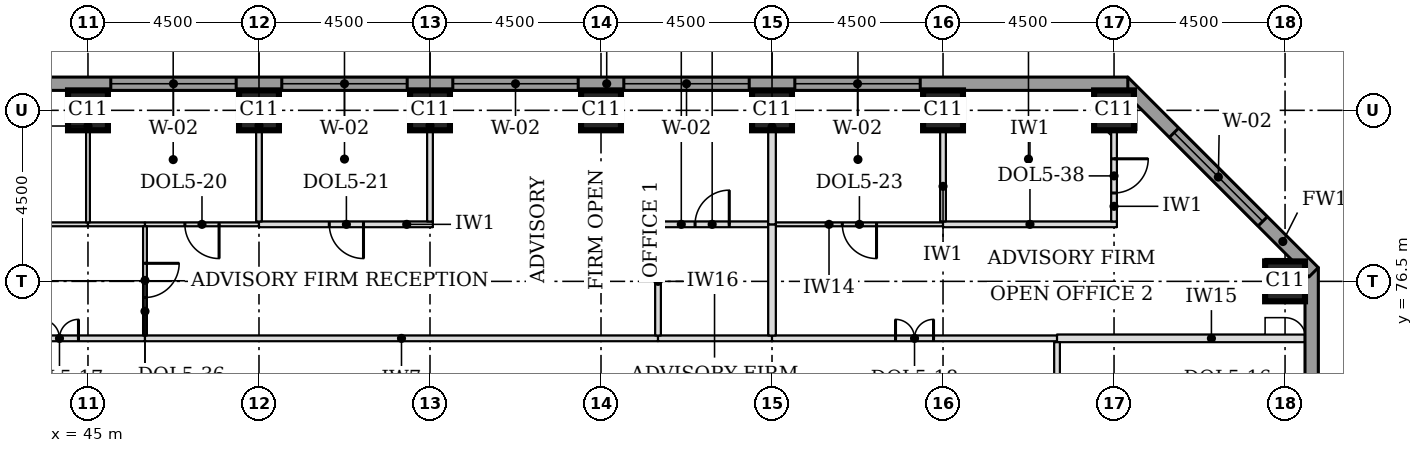
"""IFC4 building model, lengths in metres.
Left out: names, types, materials, properties, quantities, classifications, styles, units other than length and angle.
Written with IfcOpenShell. Run it as: python <this file> out.ifc"""

import sys

from ifc_helpers import new_model, si_unit, direction, frame, frame_2d, origin, origin_2d, place, context, subcontext, project, spatial, rectangle, extrude, element, fill, save


model = new_model("IFC4")
c1 = context("Model", 3, precision=1e-05, world=origin(), true_north=direction((0.0, 1.0)))
c2 = subcontext(c1, "Body", "Model", "MODEL_VIEW")
j1 = project(units=[si_unit("LENGTHUNIT", "METRE"), si_unit("PLANEANGLEUNIT", "RADIAN")], contexts=[c1])
p1 = place(None, origin())
s1 = spatial("IfcSite", under=j1, at=p1, CompositionType="ELEMENT")
p2 = place(p1, origin())
s2 = spatial("IfcBuilding", under=s1, at=p2, CompositionType="ELEMENT")
p3 = place(p2, frame((0.0, 0.0, 108.5)))
s3 = spatial("IfcBuildingStorey", under=s2, at=p3, CompositionType="ELEMENT", Elevation=108.5)
for number, where, z_axis, x_axis in (
    (1, (76.5, 76.5, 0.0), (0.0, 0.0, 1.0), (1.0, 0.0, 0.0)),
    (2, (45.0, 81.0, 0.0), (0.0, 0.0, 1.0), (1.0, 0.0, 0.0)),
    (3, (49.5, 81.0, 0.0), (0.0, 0.0, 1.0), (1.0, 0.0, 0.0)),
    (4, (54.0, 81.0, 0.0), (0.0, 0.0, 1.0), (1.0, 0.0, 0.0)),
    (5, (58.5, 81.0, 0.0), (0.0, 0.0, 1.0), (1.0, 0.0, 0.0)),
    (6, (63.0, 81.0, 0.0), (0.0, 0.0, 1.0), (1.0, 0.0, 0.0)),
    (7, (67.5, 81.0, 0.0), (0.0, 0.0, 1.0), (1.0, 0.0, 0.0)),
    (8, (72.0, 81.0, 0.0), (0.0, 0.0, 1.0), (1.0, 0.0, 0.0)),
):
    element("IfcColumn", number, at=place(p3, frame(where, z_axis=z_axis, x_axis=x_axis)), inside=s3, PredefinedType="COLUMN", context=c2, shape_type="SweptSolid", body=[
        extrude(rectangle(XDim=1.05, YDim=1.05, at=origin_2d()), origin(), (0.0, 0.0, 1.0), 3.7),
    ])
p4 = place(p3, frame((77.2, 44.638, 0.0), z_axis=(0.0, 0.0, 1.0), x_axis=(0.0, 1.0, 0.0)))
e9 = element("IfcWall", 9, at=p4, inside=s3, PredefinedType="STANDARD", context=c2, shape_type="SweptSolid", body=[
    extrude(rectangle(XDim=32.225, YDim=0.35, at=frame_2d((16.112, 0.0))), origin(), (0.0, 0.0, 1.0), 3.525),
])
p5 = place(p4, frame((5.462, 0.0, 0.9)))
e10 = element("IfcOpeningElement", 10, at=p5, cuts=e9, PredefinedType="OPENING", context=c2, shape_type="SweptSolid", body=[
    extrude(rectangle(XDim=3.3, YDim=1.9, at=frame_2d((1.65, 0.95))), frame((0.0, 0.185, 0.0), z_axis=(0.0, -1.0, 0.0), x_axis=(1.0, 0.0, 0.0)), (0.0, 0.0, 1.0), 0.37),
])
p6 = place(p4, frame((9.962, 0.0, 0.9)))
e11 = element("IfcOpeningElement", 11, at=p6, cuts=e9, PredefinedType="OPENING", context=c2, shape_type="SweptSolid", body=[
    extrude(rectangle(XDim=3.3, YDim=1.9, at=frame_2d((1.65, 0.95))), frame((0.0, 0.185, 0.0), z_axis=(0.0, -1.0, 0.0), x_axis=(1.0, 0.0, 0.0)), (0.0, 0.0, 1.0), 0.37),
])
p7 = place(p4, frame((14.462, 0.0, 0.9)))
e12 = element("IfcOpeningElement", 12, at=p7, cuts=e9, PredefinedType="OPENING", context=c2, shape_type="SweptSolid", body=[
    extrude(rectangle(XDim=3.3, YDim=1.9, at=frame_2d((1.65, 0.95))), frame((0.0, 0.185, 0.0), z_axis=(0.0, -1.0, 0.0), x_axis=(1.0, 0.0, 0.0)), (0.0, 0.0, 1.0), 0.37),
])
p8 = place(p4, frame((18.962, 0.0, 0.9)))
e13 = element("IfcOpeningElement", 13, at=p8, cuts=e9, PredefinedType="OPENING", context=c2, shape_type="SweptSolid", body=[
    extrude(rectangle(XDim=3.3, YDim=1.9, at=frame_2d((1.65, 0.95))), frame((0.0, 0.185, 0.0), z_axis=(0.0, -1.0, 0.0), x_axis=(1.0, 0.0, 0.0)), (0.0, 0.0, 1.0), 0.37),
])
p9 = place(p4, frame((23.462, 0.0, 0.9)))
e14 = element("IfcOpeningElement", 14, at=p9, cuts=e9, PredefinedType="OPENING", context=c2, shape_type="SweptSolid", body=[
    extrude(rectangle(XDim=3.3, YDim=1.9, at=frame_2d((1.65, 0.95))), frame((0.0, 0.185, 0.0), z_axis=(0.0, -1.0, 0.0), x_axis=(1.0, 0.0, 0.0)), (0.0, 0.0, 1.0), 0.37),
])
p10 = place(p3, frame((77.251, 76.739, 0.0), z_axis=(0.0, 0.0, 1.0), x_axis=(-0.707106781187, 0.707106781187, 0.0)))
e15 = element("IfcWall", 15, at=p10, inside=s3, PredefinedType="STANDARD", context=c2, shape_type="SweptSolid", body=[
    extrude(rectangle(XDim=7.089, YDim=0.35, at=frame_2d((3.544, 0.0))), origin(), (0.0, 0.0, 1.0), 3.525),
])
p11 = place(p10, frame((1.894, 0.0, 0.9)))
e16 = element("IfcOpeningElement", 16, at=p11, cuts=e15, PredefinedType="OPENING", context=c2, shape_type="SweptSolid", body=[
    extrude(rectangle(XDim=3.3, YDim=1.9, at=frame_2d((1.65, 0.95))), frame((0.0, 0.185, 0.0), z_axis=(0.0, -1.0, 0.0), x_axis=(1.0, 0.0, 0.0)), (0.0, 0.0, 1.0), 0.37),
])
p12 = place(p3, frame((72.362, 81.7, 0.0), z_axis=(0.0, 0.0, 1.0), x_axis=(-1.0, 0.0, 0.0)))
e17 = element("IfcWall", 17, at=p12, inside=s3, PredefinedType="STANDARD", context=c2, shape_type="SweptSolid", body=[
    extrude(rectangle(XDim=32.225, YDim=0.35, at=frame_2d((16.112, 0.0))), origin(), (0.0, 0.0, 1.0), 3.525),
])
p13 = place(p12, frame((5.462, 0.0, 0.9)))
e18 = element("IfcOpeningElement", 18, at=p13, cuts=e17, PredefinedType="OPENING", context=c2, shape_type="SweptSolid", body=[
    extrude(rectangle(XDim=3.3, YDim=1.9, at=frame_2d((1.65, 0.95))), frame((0.0, 0.185, 0.0), z_axis=(0.0, -1.0, 0.0), x_axis=(1.0, 0.0, 0.0)), (0.0, 0.0, 1.0), 0.37),
])
p14 = place(p12, frame((9.962, 0.0, 0.9)))
e19 = element("IfcOpeningElement", 19, at=p14, cuts=e17, PredefinedType="OPENING", context=c2, shape_type="SweptSolid", body=[
    extrude(rectangle(XDim=3.3, YDim=1.9, at=frame_2d((1.65, 0.95))), frame((0.0, 0.185, 0.0), z_axis=(0.0, -1.0, 0.0), x_axis=(1.0, 0.0, 0.0)), (0.0, 0.0, 1.0), 0.37),
])
p15 = place(p12, frame((14.462, 0.0, 0.9)))
e20 = element("IfcOpeningElement", 20, at=p15, cuts=e17, PredefinedType="OPENING", context=c2, shape_type="SweptSolid", body=[
    extrude(rectangle(XDim=3.3, YDim=1.9, at=frame_2d((1.65, 0.95))), frame((0.0, 0.185, 0.0), z_axis=(0.0, -1.0, 0.0), x_axis=(1.0, 0.0, 0.0)), (0.0, 0.0, 1.0), 0.37),
])
p16 = place(p12, frame((18.962, 0.0, 0.9)))
e21 = element("IfcOpeningElement", 21, at=p16, cuts=e17, PredefinedType="OPENING", context=c2, shape_type="SweptSolid", body=[
    extrude(rectangle(XDim=3.3, YDim=1.9, at=frame_2d((1.65, 0.95))), frame((0.0, 0.185, 0.0), z_axis=(0.0, -1.0, 0.0), x_axis=(1.0, 0.0, 0.0)), (0.0, 0.0, 1.0), 0.37),
])
p17 = place(p12, frame((23.462, 0.0, 0.9)))
e22 = element("IfcOpeningElement", 22, at=p17, cuts=e17, PredefinedType="OPENING", context=c2, shape_type="SweptSolid", body=[
    extrude(rectangle(XDim=3.3, YDim=1.9, at=frame_2d((1.65, 0.95))), frame((0.0, 0.185, 0.0), z_axis=(0.0, -1.0, 0.0), x_axis=(1.0, 0.0, 0.0)), (0.0, 0.0, 1.0), 0.37),
])
p18 = place(p3, frame((42.0, 75.0, 0.0), z_axis=(0.0, 0.0, 1.0), x_axis=(1.0, 0.0, 0.0)))
e23 = element("IfcWall", 23, at=p18, inside=s3, PredefinedType="PARTITIONING", context=c2, shape_type="SweptSolid", body=[
    extrude(rectangle(XDim=4.5, YDim=0.15, at=frame_2d((2.25, 0.0))), origin(), (0.0, 0.0, 1.0), 3.55),
])
p19 = place(p18, frame((1.75, 0.0, 0.0)))
e24 = element("IfcOpeningElement", 24, at=p19, cuts=e23, PredefinedType="OPENING", context=c2, shape_type="SweptSolid", body=[
    extrude(rectangle(XDim=1.0, YDim=2.1, at=frame_2d((0.5, 1.05))), frame((0.0, 0.085, 0.0), z_axis=(0.0, -1.0, 0.0), x_axis=(1.0, 0.0, 0.0)), (0.0, 0.0, 1.0), 0.17),
])
p20 = place(p3, frame((46.5, 75.0, 0.0), z_axis=(0.0, 0.0, 1.0), x_axis=(1.0, 0.0, 0.0)))
e25 = element("IfcWall", 25, at=p20, inside=s3, PredefinedType="PARTITIONING", context=c2, shape_type="SweptSolid", body=[
    extrude(rectangle(XDim=13.5, YDim=0.15, at=frame_2d((6.75, 0.0))), origin(), (0.0, 0.0, 1.0), 3.55),
])
p21 = place(p3, frame((60.0, 75.0, 0.0), z_axis=(0.0, 0.0, 1.0), x_axis=(1.0, 0.0, 0.0)))
e26 = element("IfcWall", 26, at=p21, inside=s3, PredefinedType="PARTITIONING", context=c2, shape_type="SweptSolid", body=[
    extrude(rectangle(XDim=3.0, YDim=0.15, at=frame_2d((1.5, 0.0))), origin(), (0.0, 0.0, 1.0), 3.55),
])
p22 = place(p3, frame((63.0, 75.0, 0.0), z_axis=(0.0, 0.0, 1.0), x_axis=(1.0, 0.0, 0.0)))
e27 = element("IfcWall", 27, at=p22, inside=s3, PredefinedType="PARTITIONING", context=c2, shape_type="SweptSolid", body=[
    extrude(rectangle(XDim=7.5, YDim=0.15, at=frame_2d((3.75, 0.0))), origin(), (0.0, 0.0, 1.0), 3.55),
])
p23 = place(p22, frame((3.25, 0.0, 0.0)))
e28 = element("IfcOpeningElement", 28, at=p23, cuts=e27, PredefinedType="OPENING", context=c2, shape_type="SweptSolid", body=[
    extrude(rectangle(XDim=1.0, YDim=2.1, at=frame_2d((0.5, 1.05))), frame((0.0, 0.085, 0.0), z_axis=(0.0, -1.0, 0.0), x_axis=(1.0, 0.0, 0.0)), (0.0, 0.0, 1.0), 0.17),
])
p24 = place(p3, frame((70.5, 75.0, 0.0), z_axis=(0.0, 0.0, 1.0), x_axis=(1.0, 0.0, 0.0)))
e29 = element("IfcWall", 29, at=p24, inside=s3, PredefinedType="PARTITIONING", context=c2, shape_type="SweptSolid", body=[
    extrude(rectangle(XDim=6.525, YDim=0.2, at=frame_2d((3.262, 0.0))), origin(), (0.0, 0.0, 1.0), 3.55),
])
p25 = place(p3, frame((40.55, 78.0, 0.0), z_axis=(0.0, 0.0, 1.0), x_axis=(1.0, 0.0, 0.0)))
e30 = element("IfcWall", 30, at=p25, inside=s3, PredefinedType="PARTITIONING", context=c2, shape_type="SweptSolid", body=[
    extrude(rectangle(XDim=4.45, YDim=0.1, at=frame_2d((2.225, 0.0))), origin(), (0.0, 0.0, 1.0), 3.55),
])
p26 = place(p25, frame((1.8, 0.0, 0.0)))
e31 = element("IfcOpeningElement", 31, at=p26, cuts=e30, PredefinedType="OPENING", context=c2, shape_type="SweptSolid", body=[
    extrude(rectangle(XDim=0.9, YDim=2.1, at=frame_2d((0.45, 1.05))), frame((0.0, 0.06, 0.0), z_axis=(0.0, -1.0, 0.0), x_axis=(1.0, 0.0, 0.0)), (0.0, 0.0, 1.0), 0.12),
])
p27 = place(p3, frame((45.0, 78.0, 0.0), z_axis=(0.0, 0.0, 1.0), x_axis=(1.0, 0.0, 0.0)))
e32 = element("IfcWall", 32, at=p27, inside=s3, PredefinedType="PARTITIONING", context=c2, shape_type="SweptSolid", body=[
    extrude(rectangle(XDim=1.5, YDim=0.1, at=frame_2d((0.75, 0.0))), origin(), (0.0, 0.0, 1.0), 3.55),
])
p28 = place(p3, frame((46.5, 78.0, 0.0), z_axis=(0.0, 0.0, 1.0), x_axis=(1.0, 0.0, 0.0)))
e33 = element("IfcWall", 33, at=p28, inside=s3, PredefinedType="PARTITIONING", context=c2, shape_type="SweptSolid", body=[
    extrude(rectangle(XDim=3.0, YDim=0.1, at=frame_2d((1.5, 0.0))), origin(), (0.0, 0.0, 1.0), 3.55),
])
p29 = place(p28, frame((1.05, 0.0, 0.0)))
e34 = element("IfcOpeningElement", 34, at=p29, cuts=e33, PredefinedType="OPENING", context=c2, shape_type="SweptSolid", body=[
    extrude(rectangle(XDim=0.9, YDim=2.1, at=frame_2d((0.45, 1.05))), frame((0.0, 0.06, 0.0), z_axis=(0.0, -1.0, 0.0), x_axis=(1.0, 0.0, 0.0)), (0.0, 0.0, 1.0), 0.12),
])
p30 = place(p3, frame((49.5, 78.0, 0.0), z_axis=(0.0, 0.0, 1.0), x_axis=(1.0, 0.0, 0.0)))
e35 = element("IfcWall", 35, at=p30, inside=s3, PredefinedType="PARTITIONING", context=c2, shape_type="SweptSolid", body=[
    extrude(rectangle(XDim=4.575, YDim=0.15, at=frame_2d((2.288, 0.0))), origin(), (0.0, 0.0, 1.0), 3.55),
])
p31 = place(p30, frame((1.85, 0.0, 0.0)))
e36 = element("IfcOpeningElement", 36, at=p31, cuts=e35, PredefinedType="OPENING", context=c2, shape_type="SweptSolid", body=[
    extrude(rectangle(XDim=0.9, YDim=2.1, at=frame_2d((0.45, 1.05))), frame((0.0, 0.085, 0.0), z_axis=(0.0, -1.0, 0.0), x_axis=(1.0, 0.0, 0.0)), (0.0, 0.0, 1.0), 0.17),
])
p32 = place(p3, frame((59.925, 78.0, 0.0), z_axis=(0.0, 0.0, 1.0), x_axis=(1.0, 0.0, 0.0)))
e37 = element("IfcWall", 37, at=p32, inside=s3, PredefinedType="PARTITIONING", context=c2, shape_type="SweptSolid", body=[
    extrude(rectangle(XDim=2.975, YDim=0.15, at=frame_2d((1.487, 0.0))), origin(), (0.0, 0.0, 1.0), 3.55),
])
p33 = place(p32, frame((1.05, 0.0, 0.0)))
e38 = element("IfcOpeningElement", 38, at=p33, cuts=e37, PredefinedType="OPENING", context=c2, shape_type="SweptSolid", body=[
    extrude(rectangle(XDim=0.9, YDim=2.1, at=frame_2d((0.45, 1.05))), frame((0.0, 0.085, 0.0), z_axis=(0.0, -1.0, 0.0), x_axis=(1.0, 0.0, 0.0)), (0.0, 0.0, 1.0), 0.17),
])
p34 = place(p3, frame((63.1, 78.0, 0.0), z_axis=(0.0, 0.0, 1.0), x_axis=(1.0, 0.0, 0.0)))
e39 = element("IfcWall", 39, at=p34, inside=s3, PredefinedType="PARTITIONING", context=c2, shape_type="SweptSolid", body=[
    extrude(rectangle(XDim=4.4, YDim=0.1, at=frame_2d((2.2, 0.0))), origin(), (0.0, 0.0, 1.0), 3.55),
])
p35 = place(p34, frame((1.75, 0.0, 0.0)))
e40 = element("IfcOpeningElement", 40, at=p35, cuts=e39, PredefinedType="OPENING", context=c2, shape_type="SweptSolid", body=[
    extrude(rectangle(XDim=0.9, YDim=2.1, at=frame_2d((0.45, 1.05))), frame((0.0, 0.06, 0.0), z_axis=(0.0, -1.0, 0.0), x_axis=(1.0, 0.0, 0.0)), (0.0, 0.0, 1.0), 0.12),
])
p36 = place(p3, frame((67.5, 78.0, 0.0), z_axis=(0.0, 0.0, 1.0), x_axis=(1.0, 0.0, 0.0)))
e41 = element("IfcWall", 41, at=p36, inside=s3, PredefinedType="PARTITIONING", context=c2, shape_type="SweptSolid", body=[
    extrude(rectangle(XDim=4.575, YDim=0.15, at=frame_2d((2.288, 0.0))), origin(), (0.0, 0.0, 1.0), 3.55),
])
p37 = place(p3, frame((70.5, 57.0, 0.0), z_axis=(0.0, 0.0, 1.0), x_axis=(0.0, 1.0, 0.0)))
e42 = element("IfcWall", 42, at=p37, inside=s3, PredefinedType="PARTITIONING", context=c2, shape_type="SweptSolid", body=[
    extrude(rectangle(XDim=17.9, YDim=0.15, at=frame_2d((8.95, 0.0))), origin(), (0.0, 0.0, 1.0), 3.55),
])
p38 = place(p37, frame((8.45, 0.0, 0.0)))
e43 = element("IfcOpeningElement", 43, at=p38, cuts=e42, PredefinedType="OPENING", context=c2, shape_type="SweptSolid", body=[
    extrude(rectangle(XDim=1.0, YDim=2.1, at=frame_2d((0.5, 1.05))), frame((0.0, 0.085, 0.0), z_axis=(0.0, -1.0, 0.0), x_axis=(1.0, 0.0, 0.0)), (0.0, 0.0, 1.0), 0.17),
])
p39 = place(p3, frame((46.5, 75.075, 0.0), z_axis=(0.0, 0.0, 1.0), x_axis=(0.0, 1.0, 0.0)))
e44 = element("IfcWall", 44, at=p39, inside=s3, PredefinedType="PARTITIONING", context=c2, shape_type="SweptSolid", body=[
    extrude(rectangle(XDim=2.875, YDim=0.1, at=frame_2d((1.438, 0.0))), origin(), (0.0, 0.0, 1.0), 3.022),
])
p40 = place(p39, frame((1.0, 0.0, 0.0)))
e45 = element("IfcOpeningElement", 45, at=p40, cuts=e44, PredefinedType="OPENING", context=c2, shape_type="SweptSolid", body=[
    extrude(rectangle(XDim=0.9, YDim=2.1, at=frame_2d((0.45, 1.05))), frame((0.0, 0.06, 0.0), z_axis=(0.0, -1.0, 0.0), x_axis=(1.0, 0.0, 0.0)), (0.0, 0.0, 1.0), 0.12),
])
p41 = place(p3, frame((60.0, 75.075, 0.0), z_axis=(0.0, 0.0, 1.0), x_axis=(0.0, 1.0, 0.0)))
e46 = element("IfcWall", 46, at=p41, inside=s3, PredefinedType="PARTITIONING", context=c2, shape_type="SweptSolid", body=[
    extrude(rectangle(XDim=2.85, YDim=0.15, at=frame_2d((1.425, 0.0))), origin(), (0.0, 0.0, 1.0), 3.55),
])
p42 = place(p3, frame((63.0, 75.075, 0.0), z_axis=(0.0, 0.0, 1.0), x_axis=(0.0, 1.0, 0.0)))
e47 = element("IfcWall", 47, at=p42, inside=s3, PredefinedType="PARTITIONING", context=c2, shape_type="SweptSolid", body=[
    extrude(rectangle(XDim=2.925, YDim=0.2, at=frame_2d((1.462, 0.0))), origin(), (0.0, 0.0, 1.0), 3.55),
])
p43 = place(p3, frame((63.0, 78.0, 0.0), z_axis=(0.0, 0.0, 1.0), x_axis=(0.0, 1.0, 0.0)))
e48 = element("IfcWall", 48, at=p43, inside=s3, PredefinedType="PARTITIONING", context=c2, shape_type="SweptSolid", body=[
    extrude(rectangle(XDim=3.525, YDim=0.2, at=frame_2d((1.762, 0.0))), origin(), (0.0, 0.0, 1.0), 3.55),
])
p44 = place(p3, frame((45.0, 78.05, 0.0), z_axis=(0.0, 0.0, 1.0), x_axis=(0.0, 1.0, 0.0)))
e49 = element("IfcWall", 49, at=p44, inside=s3, PredefinedType="PARTITIONING", context=c2, shape_type="SweptSolid", body=[
    extrude(rectangle(XDim=3.475, YDim=0.1, at=frame_2d((1.737, 0.0))), origin(), (0.0, 0.0, 1.0), 3.55),
])
for number, where, z_axis, x_axis in (
    (50, (49.5, 78.075, 0.0), (0.0, 0.0, 1.0), (0.0, 1.0, 0.0)),
    (51, (54.0, 78.075, 0.0), (0.0, 0.0, 1.0), (0.0, 1.0, 0.0)),
    (52, (67.5, 78.075, 0.0), (0.0, 0.0, 1.0), (0.0, 1.0, 0.0)),
):
    element("IfcWall", number, at=place(p3, frame(where, z_axis=z_axis, x_axis=x_axis)), inside=s3, PredefinedType="PARTITIONING", context=c2, shape_type="SweptSolid", body=[
        extrude(rectangle(XDim=3.45, YDim=0.15, at=frame_2d((1.725, 0.0))), origin(), (0.0, 0.0, 1.0), 3.55),
    ])
p45 = place(p3, frame((72.0, 78.075, 0.0), z_axis=(0.0, 0.0, 1.0), x_axis=(0.0, 1.0, 0.0)))
e53 = element("IfcWall", 53, at=p45, inside=s3, PredefinedType="PARTITIONING", context=c2, shape_type="SweptSolid", body=[
    extrude(rectangle(XDim=2.4, YDim=0.15, at=frame_2d((1.2, 0.0))), origin(), (0.0, 0.0, 1.0), 3.55),
])
p46 = place(p45, frame((0.75, 0.0, 0.0)))
e54 = element("IfcOpeningElement", 54, at=p46, cuts=e53, PredefinedType="OPENING", context=c2, shape_type="SweptSolid", body=[
    extrude(rectangle(XDim=0.9, YDim=2.1, at=frame_2d((0.45, 1.05))), frame((0.0, 0.085, 0.0), z_axis=(0.0, -1.0, 0.0), x_axis=(1.0, 0.0, 0.0)), (0.0, 0.0, 1.0), 0.17),
])
p47 = place(p11, origin())
e55 = element("IfcWindow", 55, at=p47, inside=s3, PartitioningType="SINGLE_PANEL", PredefinedType="WINDOW", context=c2, shape_type="SweptSolid", body=[
    extrude(rectangle(XDim=3.3, YDim=1.9, at=frame_2d((1.65, 0.95))), frame((0.0, 0.085, 0.0), z_axis=(0.0, -1.0, 0.0), x_axis=(1.0, 0.0, 0.0)), (0.0, 0.0, 1.0), 0.06),
])
fill(e16, e55)
p48 = place(p13, origin())
e56 = element("IfcWindow", 56, at=p48, inside=s3, PartitioningType="SINGLE_PANEL", PredefinedType="WINDOW", context=c2, shape_type="SweptSolid", body=[
    extrude(rectangle(XDim=3.3, YDim=1.9, at=frame_2d((1.65, 0.95))), frame((0.0, 0.085, 0.0), z_axis=(0.0, -1.0, 0.0), x_axis=(1.0, 0.0, 0.0)), (0.0, 0.0, 1.0), 0.06),
])
fill(e18, e56)
p49 = place(p14, origin())
e57 = element("IfcWindow", 57, at=p49, inside=s3, PartitioningType="SINGLE_PANEL", PredefinedType="WINDOW", context=c2, shape_type="SweptSolid", body=[
    extrude(rectangle(XDim=3.3, YDim=1.9, at=frame_2d((1.65, 0.95))), frame((0.0, 0.085, 0.0), z_axis=(0.0, -1.0, 0.0), x_axis=(1.0, 0.0, 0.0)), (0.0, 0.0, 1.0), 0.06),
])
fill(e19, e57)
p50 = place(p15, origin())
e58 = element("IfcWindow", 58, at=p50, inside=s3, PartitioningType="SINGLE_PANEL", PredefinedType="WINDOW", context=c2, shape_type="SweptSolid", body=[
    extrude(rectangle(XDim=3.3, YDim=1.9, at=frame_2d((1.65, 0.95))), frame((0.0, 0.085, 0.0), z_axis=(0.0, -1.0, 0.0), x_axis=(1.0, 0.0, 0.0)), (0.0, 0.0, 1.0), 0.06),
])
fill(e20, e58)
p51 = place(p16, origin())
e59 = element("IfcWindow", 59, at=p51, inside=s3, PartitioningType="SINGLE_PANEL", PredefinedType="WINDOW", context=c2, shape_type="SweptSolid", body=[
    extrude(rectangle(XDim=3.3, YDim=1.9, at=frame_2d((1.65, 0.95))), frame((0.0, 0.085, 0.0), z_axis=(0.0, -1.0, 0.0), x_axis=(1.0, 0.0, 0.0)), (0.0, 0.0, 1.0), 0.06),
])
fill(e21, e59)
p52 = place(p17, origin())
e60 = element("IfcWindow", 60, at=p52, inside=s3, PartitioningType="SINGLE_PANEL", PredefinedType="WINDOW", context=c2, shape_type="SweptSolid", body=[
    extrude(rectangle(XDim=3.3, YDim=1.9, at=frame_2d((1.65, 0.95))), frame((0.0, 0.085, 0.0), z_axis=(0.0, -1.0, 0.0), x_axis=(1.0, 0.0, 0.0)), (0.0, 0.0, 1.0), 0.06),
])
fill(e22, e60)
p53 = place(p19, origin())
e61 = element("IfcDoor", 61, at=p53, inside=s3, OperationType="DOUBLE_DOOR_SINGLE_SWING", PredefinedType="DOOR", context=c2, shape_type="SweptSolid", body=[
    extrude(rectangle(XDim=1.0, YDim=2.1, at=frame_2d((0.5, 1.05))), frame((0.0, 0.025, 0.0), z_axis=(0.0, -1.0, 0.0), x_axis=(1.0, 0.0, 0.0)), (0.0, 0.0, 1.0), 0.05),
])
fill(e24, e61)
p54 = place(p40, frame((0.9, 0.0, 0.0), z_axis=(0.0, 0.0, 1.0), x_axis=(-1.0, 0.0, 0.0)))
e62 = element("IfcDoor", 62, at=p54, inside=s3, OperationType="SINGLE_SWING_LEFT", PredefinedType="DOOR", context=c2, shape_type="SweptSolid", body=[
    extrude(rectangle(XDim=0.9, YDim=2.1, at=frame_2d((0.45, 1.05))), frame((0.0, 0.025, 0.0), z_axis=(0.0, -1.0, 0.0), x_axis=(1.0, 0.0, 0.0)), (0.0, 0.0, 1.0), 0.05),
])
fill(e45, e62)
p55 = place(p29, frame((0.9, 0.0, 0.0), z_axis=(0.0, 0.0, 1.0), x_axis=(-1.0, 0.0, 0.0)))
e63 = element("IfcDoor", 63, at=p55, inside=s3, OperationType="SINGLE_SWING_LEFT", PredefinedType="DOOR", context=c2, shape_type="SweptSolid", body=[
    extrude(rectangle(XDim=0.9, YDim=2.1, at=frame_2d((0.45, 1.05))), frame((0.0, 0.025, 0.0), z_axis=(0.0, -1.0, 0.0), x_axis=(1.0, 0.0, 0.0)), (0.0, 0.0, 1.0), 0.05),
])
fill(e34, e63)
p56 = place(p33, origin())
e64 = element("IfcDoor", 64, at=p56, inside=s3, OperationType="SINGLE_SWING_RIGHT", PredefinedType="DOOR", context=c2, shape_type="SweptSolid", body=[
    extrude(rectangle(XDim=0.9, YDim=2.1, at=frame_2d((0.45, 1.05))), frame((0.0, 0.025, 0.0), z_axis=(0.0, -1.0, 0.0), x_axis=(1.0, 0.0, 0.0)), (0.0, 0.0, 1.0), 0.05),
])
fill(e38, e64)
p57 = place(p31, frame((0.9, 0.0, 0.0), z_axis=(0.0, 0.0, 1.0), x_axis=(-1.0, 0.0, 0.0)))
e65 = element("IfcDoor", 65, at=p57, inside=s3, OperationType="SINGLE_SWING_LEFT", PredefinedType="DOOR", context=c2, shape_type="SweptSolid", body=[
    extrude(rectangle(XDim=0.9, YDim=2.1, at=frame_2d((0.45, 1.05))), frame((0.0, 0.025, 0.0), z_axis=(0.0, -1.0, 0.0), x_axis=(1.0, 0.0, 0.0)), (0.0, 0.0, 1.0), 0.05),
])
fill(e36, e65)
p58 = place(p23, origin())
e66 = element("IfcDoor", 66, at=p58, inside=s3, OperationType="DOUBLE_DOOR_SINGLE_SWING", PredefinedType="DOOR", context=c2, shape_type="SweptSolid", body=[
    extrude(rectangle(XDim=1.0, YDim=2.1, at=frame_2d((0.5, 1.05))), frame((0.0, 0.025, 0.0), z_axis=(0.0, -1.0, 0.0), x_axis=(1.0, 0.0, 0.0)), (0.0, 0.0, 1.0), 0.05),
])
fill(e28, e66)
p59 = place(p35, frame((0.9, 0.0, 0.0), z_axis=(0.0, 0.0, 1.0), x_axis=(-1.0, 0.0, 0.0)))
e67 = element("IfcDoor", 67, at=p59, inside=s3, OperationType="SINGLE_SWING_LEFT", PredefinedType="DOOR", context=c2, shape_type="SweptSolid", body=[
    extrude(rectangle(XDim=0.9, YDim=2.1, at=frame_2d((0.45, 1.05))), frame((0.0, 0.025, 0.0), z_axis=(0.0, -1.0, 0.0), x_axis=(1.0, 0.0, 0.0)), (0.0, 0.0, 1.0), 0.05),
])
fill(e40, e67)
p60 = place(p46, frame((0.9, 0.0, 0.0), z_axis=(0.0, 0.0, 1.0), x_axis=(-1.0, 0.0, 0.0)))
e68 = element("IfcDoor", 68, at=p60, inside=s3, OperationType="SINGLE_SWING_LEFT", PredefinedType="DOOR", context=c2, shape_type="SweptSolid", body=[
    extrude(rectangle(XDim=0.9, YDim=2.1, at=frame_2d((0.45, 1.05))), frame((0.0, 0.025, 0.0), z_axis=(0.0, -1.0, 0.0), x_axis=(1.0, 0.0, 0.0)), (0.0, 0.0, 1.0), 0.05),
])
fill(e54, e68)
save(model, sys.argv[1])
